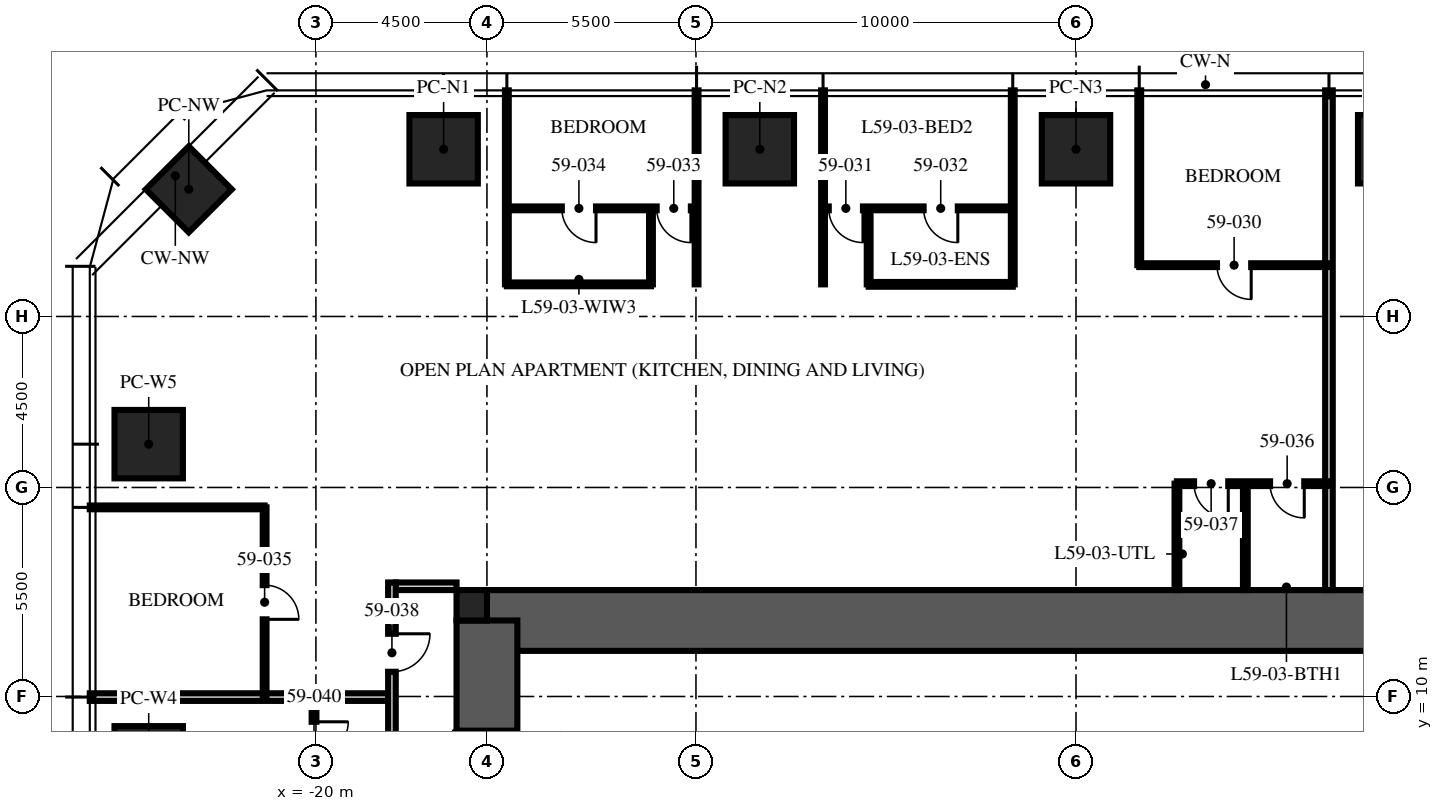
"""IFC4 building model, lengths in metres.
Left out: names, types, materials, properties, quantities, classifications, styles, units other than length and angle.
Written with IfcOpenShell. Run it as: python <this file> out.ifc"""

import sys

from ifc_helpers import new_model, si_unit, direction, frame, frame_2d, origin, origin_2d, place, context, subcontext, project, spatial, rectangle, extrude, element, fill, save


model = new_model("IFC4")
c1 = context("Model", 3, precision=1e-05, world=origin(), true_north=direction((0.0, 1.0)))
c2 = subcontext(c1, "Body", "Model", "MODEL_VIEW")
j1 = project(units=[si_unit("LENGTHUNIT", "METRE"), si_unit("PLANEANGLEUNIT", "RADIAN")], contexts=[c1])
p1 = place(None, origin())
s1 = spatial("IfcSite", under=j1, at=p1, CompositionType="ELEMENT")
p2 = place(p1, origin())
s2 = spatial("IfcBuilding", under=s1, at=p2, CompositionType="ELEMENT")
p3 = place(p2, frame((0.0, 0.0, 237.0)))
s3 = spatial("IfcBuildingStorey", under=s2, at=p3, CompositionType="ELEMENT", Elevation=237.0)
p4 = place(p3, frame((-15.5, 12.0, -0.25), z_axis=(0.0, 0.0, 1.0), x_axis=(1.0, 0.0, 0.0)))
e1 = element("IfcWall", 1, at=p4, inside=s3, PredefinedType="SHEAR", context=c2, shape_type="SweptSolid", body=[
    extrude(rectangle(XDim=31.0, YDim=1.6, at=frame_2d((15.5, 0.0))), origin(), (0.0, 0.0, 1.0), 3.75),
])
p5 = place(p3, frame((-15.5, -12.0, -0.25), z_axis=(0.0, 0.0, 1.0), x_axis=(0.0, 1.0, 0.0)))
e2 = element("IfcWall", 2, at=p5, inside=s3, PredefinedType="SHEAR", context=c2, shape_type="SweptSolid", body=[
    extrude(rectangle(XDim=24.0, YDim=1.6, at=frame_2d((12.0, 0.0))), origin(), (0.0, 0.0, 1.0), 3.75),
])
p6 = place(p5, frame((3.2, 0.0, 0.25)))
e3 = element("IfcOpeningElement", 3, at=p6, cuts=e2, PredefinedType="OPENING", context=c2, shape_type="SweptSolid", body=[
    extrude(rectangle(XDim=1.2, YDim=2.1, at=frame_2d((0.6, 1.05))), frame((0.0, 0.81, 0.0), z_axis=(0.0, -1.0, 0.0), x_axis=(1.0, 0.0, 0.0)), (0.0, 0.0, 1.0), 1.62),
])
p7 = place(p5, frame((19.3, 0.0, 0.25)))
e4 = element("IfcOpeningElement", 4, at=p7, cuts=e2, PredefinedType="OPENING", context=c2, shape_type="SweptSolid", body=[
    extrude(rectangle(XDim=1.8, YDim=2.1, at=frame_2d((0.9, 1.05))), frame((0.0, 0.81, 0.0), z_axis=(0.0, -1.0, 0.0), x_axis=(1.0, 0.0, 0.0)), (0.0, 0.0, 1.0), 1.62),
])
p8 = place(p3, frame((-15.9, 12.4, -0.25), z_axis=(0.0, 0.0, 1.0), x_axis=(1.0, 0.0, 0.0)))
e5 = element("IfcColumn", 5, at=p8, inside=s3, PredefinedType="COLUMN", context=c2, shape_type="SweptSolid", body=[
    extrude(rectangle(XDim=0.8, YDim=0.8, at=origin_2d()), origin(), (0.0, 0.0, 1.0), 3.75),
])
for number, where, z_axis, x_axis in (
    (6, (-16.64, 24.4, 0.0), (0.0, 0.0, 1.0), (1.0, 0.0, 0.0)),
    (7, (-8.32, 24.4, 0.0), (0.0, 0.0, 1.0), (1.0, 0.0, 0.0)),
    (8, (0.0, 24.4, 0.0), (0.0, 0.0, 1.0), (1.0, 0.0, 0.0)),
    (9, (8.32, 24.4, 0.0), (0.0, 0.0, 1.0), (1.0, 0.0, 0.0)),
    (10, (-24.4, 8.32, 0.0), (0.0, 0.0, 1.0), (0.0, 1.0, 0.0)),
    (11, (-24.4, 16.64, 0.0), (0.0, 0.0, 1.0), (0.0, 1.0, 0.0)),
):
    element("IfcColumn", number, at=place(p3, frame(where, z_axis=z_axis, x_axis=x_axis)), inside=s3, PredefinedType="COLUMN", context=c2, shape_type="SweptSolid", body=[
        extrude(rectangle(XDim=1.8, YDim=1.8, at=origin_2d()), origin(), (0.0, 0.0, 1.0), 3.75),
    ])
p9 = place(p3, frame((-23.346, 23.346, 0.0), z_axis=(0.0, 0.0, 1.0), x_axis=(0.707106781187, 0.707106781187, 0.0)))
e12 = element("IfcColumn", 12, at=p9, inside=s3, PredefinedType="COLUMN", context=c2, shape_type="SweptSolid", body=[
    extrude(rectangle(XDim=1.6, YDim=1.6, at=origin_2d()), origin(), (0.0, 0.0, 1.0), 3.75),
])
p10 = place(p3, frame((-16.3, 12.9, 0.0), z_axis=(0.0, 0.0, 1.0), x_axis=(-1.0, 0.0, 0.0)))
e13 = element("IfcWall", 13, at=p10, inside=s3, PredefinedType="PARTITIONING", context=c2, shape_type="SweptSolid", body=[
    extrude(rectangle(XDim=1.6, YDim=0.2, at=frame_2d((0.8, 0.0))), origin(), (0.0, 0.0, 1.0), 2.3),
])
p11 = place(p3, frame((6.656, 12.8, 0.0), z_axis=(0.0, 0.0, 1.0), x_axis=(0.0, 1.0, 0.0)))
e14 = element("IfcWall", 14, at=p11, inside=s3, PredefinedType="PARTITIONING", context=c2, shape_type="SweptSolid", body=[
    extrude(rectangle(XDim=13.15, YDim=0.2, at=frame_2d((6.575, 0.0))), origin(), (0.0, 0.0, 1.0), 2.91),
])
p12 = place(p3, frame((1.664, 21.35, 0.0), z_axis=(0.0, 0.0, 1.0), x_axis=(0.0, 1.0, 0.0)))
e15 = element("IfcWall", 15, at=p12, inside=s3, PredefinedType="PARTITIONING", context=c2, shape_type="SweptSolid", body=[
    extrude(rectangle(XDim=4.6, YDim=0.1, at=frame_2d((2.3, 0.0))), origin(), (0.0, 0.0, 1.0), 2.91),
])
for number, where, z_axis, x_axis in (
    (16, (-1.664, 20.845, 0.0), (0.0, 0.0, 1.0), (0.0, 1.0, 0.0)),
    (17, (-6.656, 20.845, 0.0), (0.0, 0.0, 1.0), (0.0, 1.0, 0.0)),
    (18, (-9.984, 20.845, 0.0), (0.0, 0.0, 1.0), (0.0, 1.0, 0.0)),
    (19, (-14.976, 20.845, 0.0), (0.0, 0.0, 1.0), (0.0, 1.0, 0.0)),
):
    element("IfcWall", number, at=place(p3, frame(where, z_axis=z_axis, x_axis=x_axis)), inside=s3, PredefinedType="PARTITIONING", context=c2, shape_type="SweptSolid", body=[
        extrude(rectangle(XDim=5.105, YDim=0.1, at=frame_2d((2.552, 0.0))), origin(), (0.0, 0.0, 1.0), 2.91),
    ])
p13 = place(p3, frame((-21.35, 14.976, 0.0), z_axis=(0.0, 0.0, 1.0), x_axis=(-1.0, 0.0, 0.0)))
e20 = element("IfcWall", 20, at=p13, inside=s3, PredefinedType="PARTITIONING", context=c2, shape_type="SweptSolid", body=[
    extrude(rectangle(XDim=4.6, YDim=0.1, at=frame_2d((2.3, 0.0))), origin(), (0.0, 0.0, 1.0), 2.91),
])
p14 = place(p3, frame((-18.1, 9.984, 0.0), z_axis=(0.0, 0.0, 1.0), x_axis=(-1.0, 0.0, 0.0)))
e21 = element("IfcWall", 21, at=p14, inside=s3, PredefinedType="PARTITIONING", context=c2, shape_type="SweptSolid", body=[
    extrude(rectangle(XDim=7.85, YDim=0.2, at=frame_2d((3.925, 0.0))), origin(), (0.0, 0.0, 1.0), 2.91),
])
p15 = place(p3, frame((6.656, 21.35, 0.0), z_axis=(0.0, 0.0, 1.0), x_axis=(-1.0, 0.0, 0.0)))
e22 = element("IfcWall", 22, at=p15, inside=s3, PredefinedType="PARTITIONING", context=c2, shape_type="SweptSolid", body=[
    extrude(rectangle(XDim=4.992, YDim=0.1, at=frame_2d((2.496, 0.0))), origin(), (0.0, 0.0, 1.0), 2.81),
])
p16 = place(p15, frame((2.046, 0.0, 0.0)))
e23 = element("IfcOpeningElement", 23, at=p16, cuts=e22, PredefinedType="OPENING", context=c2, shape_type="SweptSolid", body=[
    extrude(rectangle(XDim=0.9, YDim=2.1, at=frame_2d((0.45, 1.05))), frame((0.0, 0.06, 0.0), z_axis=(0.0, -1.0, 0.0), x_axis=(1.0, 0.0, 0.0)), (0.0, 0.0, 1.0), 0.12),
])
p17 = place(p3, frame((-1.664, 22.845, 0.0), z_axis=(0.0, 0.0, 1.0), x_axis=(-1.0, 0.0, 0.0)))
e24 = element("IfcWall", 24, at=p17, inside=s3, PredefinedType="PARTITIONING", context=c2, shape_type="SweptSolid", body=[
    extrude(rectangle(XDim=4.992, YDim=0.1, at=frame_2d((2.496, 0.0))), origin(), (0.0, 0.0, 1.0), 2.81),
])
p18 = place(p17, frame((3.942, 0.0, 0.0)))
e25 = element("IfcOpeningElement", 25, at=p18, cuts=e24, PredefinedType="OPENING", context=c2, shape_type="SweptSolid", body=[
    extrude(rectangle(XDim=0.9, YDim=2.1, at=frame_2d((0.45, 1.05))), frame((0.0, 0.06, 0.0), z_axis=(0.0, -1.0, 0.0), x_axis=(1.0, 0.0, 0.0)), (0.0, 0.0, 1.0), 0.12),
])
p19 = place(p17, frame((1.446, 0.0, 0.0)))
e26 = element("IfcOpeningElement", 26, at=p19, cuts=e24, PredefinedType="OPENING", context=c2, shape_type="SweptSolid", body=[
    extrude(rectangle(XDim=0.9, YDim=2.1, at=frame_2d((0.45, 1.05))), frame((0.0, 0.06, 0.0), z_axis=(0.0, -1.0, 0.0), x_axis=(1.0, 0.0, 0.0)), (0.0, 0.0, 1.0), 0.12),
])
p20 = place(p3, frame((-5.456, 20.845, 0.0), z_axis=(0.0, 0.0, 1.0), x_axis=(0.0, 1.0, 0.0)))
e27 = element("IfcWall", 27, at=p20, inside=s3, PredefinedType="PARTITIONING", context=c2, shape_type="SweptSolid", body=[
    extrude(rectangle(XDim=2.0, YDim=0.1, at=frame_2d((1.0, 0.0))), origin(), (0.0, 0.0, 1.0), 3.5),
])
p21 = place(p3, frame((-1.664, 20.845, 0.0), z_axis=(0.0, 0.0, 1.0), x_axis=(-1.0, 0.0, 0.0)))
e28 = element("IfcWall", 28, at=p21, inside=s3, PredefinedType="PARTITIONING", context=c2, shape_type="SweptSolid", body=[
    extrude(rectangle(XDim=3.792, YDim=0.125, at=frame_2d((1.896, 0.0))), origin(), (0.0, 0.0, 1.0), 2.81),
])
p22 = place(p3, frame((-9.984, 22.845, 0.0), z_axis=(0.0, 0.0, 1.0), x_axis=(-1.0, 0.0, 0.0)))
e29 = element("IfcWall", 29, at=p22, inside=s3, PredefinedType="PARTITIONING", context=c2, shape_type="SweptSolid", body=[
    extrude(rectangle(XDim=4.992, YDim=0.1, at=frame_2d((2.496, 0.0))), origin(), (0.0, 0.0, 1.0), 2.81),
])
p23 = place(p22, frame((0.15, 0.0, 0.0)))
e30 = element("IfcOpeningElement", 30, at=p23, cuts=e29, PredefinedType="OPENING", context=c2, shape_type="SweptSolid", body=[
    extrude(rectangle(XDim=0.9, YDim=2.1, at=frame_2d((0.45, 1.05))), frame((0.0, 0.06, 0.0), z_axis=(0.0, -1.0, 0.0), x_axis=(1.0, 0.0, 0.0)), (0.0, 0.0, 1.0), 0.12),
])
p24 = place(p22, frame((2.646, 0.0, 0.0)))
e31 = element("IfcOpeningElement", 31, at=p24, cuts=e29, PredefinedType="OPENING", context=c2, shape_type="SweptSolid", body=[
    extrude(rectangle(XDim=0.9, YDim=2.1, at=frame_2d((0.45, 1.05))), frame((0.0, 0.06, 0.0), z_axis=(0.0, -1.0, 0.0), x_axis=(1.0, 0.0, 0.0)), (0.0, 0.0, 1.0), 0.12),
])
p25 = place(p3, frame((-11.184, 20.845, 0.0), z_axis=(0.0, 0.0, 1.0), x_axis=(0.0, 1.0, 0.0)))
e32 = element("IfcWall", 32, at=p25, inside=s3, PredefinedType="PARTITIONING", context=c2, shape_type="SweptSolid", body=[
    extrude(rectangle(XDim=2.0, YDim=0.1, at=frame_2d((1.0, 0.0))), origin(), (0.0, 0.0, 1.0), 3.5),
])
p26 = place(p3, frame((-11.184, 20.845, 0.0), z_axis=(0.0, 0.0, 1.0), x_axis=(-1.0, 0.0, 0.0)))
e33 = element("IfcWall", 33, at=p26, inside=s3, PredefinedType="PARTITIONING", context=c2, shape_type="SweptSolid", body=[
    extrude(rectangle(XDim=3.792, YDim=0.1, at=frame_2d((1.896, 0.0))), origin(), (0.0, 0.0, 1.0), 2.81),
])
p27 = place(p3, frame((-21.35, 14.976, 0.0), z_axis=(0.0, 0.0, 1.0), x_axis=(0.0, -1.0, 0.0)))
e34 = element("IfcWall", 34, at=p27, inside=s3, PredefinedType="PARTITIONING", context=c2, shape_type="SweptSolid", body=[
    extrude(rectangle(XDim=4.992, YDim=0.1, at=frame_2d((2.496, 0.0))), origin(), (0.0, 0.0, 1.0), 2.81),
])
p28 = place(p27, frame((2.046, 0.0, 0.0)))
e35 = element("IfcOpeningElement", 35, at=p28, cuts=e34, PredefinedType="OPENING", context=c2, shape_type="SweptSolid", body=[
    extrude(rectangle(XDim=0.9, YDim=2.1, at=frame_2d((0.45, 1.05))), frame((0.0, 0.06, 0.0), z_axis=(0.0, -1.0, 0.0), x_axis=(1.0, 0.0, 0.0)), (0.0, 0.0, 1.0), 0.12),
])
p29 = place(p3, frame((6.656, 15.6, 0.0), z_axis=(0.0, 0.0, 1.0), x_axis=(-1.0, 0.0, 0.0)))
e36 = element("IfcWall", 36, at=p29, inside=s3, PredefinedType="PARTITIONING", context=c2, shape_type="SweptSolid", body=[
    extrude(rectangle(XDim=4.0, YDim=0.125, at=frame_2d((2.0, 0.0))), origin(), (0.0, 0.0, 1.0), 2.81),
])
p30 = place(p29, frame((0.65, 0.0, 0.0)))
e37 = element("IfcOpeningElement", 37, at=p30, cuts=e36, PredefinedType="OPENING", context=c2, shape_type="SweptSolid", body=[
    extrude(rectangle(XDim=0.9, YDim=2.1, at=frame_2d((0.45, 1.05))), frame((0.0, 0.073, 0.0), z_axis=(0.0, -1.0, 0.0), x_axis=(1.0, 0.0, 0.0)), (0.0, 0.0, 1.0), 0.145),
])
p31 = place(p29, frame((2.65, 0.0, 0.0)))
e38 = element("IfcOpeningElement", 38, at=p31, cuts=e36, PredefinedType="OPENING", context=c2, shape_type="SweptSolid", body=[
    extrude(rectangle(XDim=0.9, YDim=2.1, at=frame_2d((0.45, 1.05))), frame((0.0, 0.073, 0.0), z_axis=(0.0, -1.0, 0.0), x_axis=(1.0, 0.0, 0.0)), (0.0, 0.0, 1.0), 0.145),
])
for number, where, z_axis, x_axis in (
    (39, (4.456, 12.8, 0.0), (0.0, 0.0, 1.0), (0.0, 1.0, 0.0)),
    (40, (2.656, 12.8, 0.0), (0.0, 0.0, 1.0), (0.0, 1.0, 0.0)),
):
    element("IfcWall", number, at=place(p3, frame(where, z_axis=z_axis, x_axis=x_axis)), inside=s3, PredefinedType="PARTITIONING", context=c2, shape_type="SweptSolid", body=[
        extrude(rectangle(XDim=2.8, YDim=0.125, at=frame_2d((1.4, 0.0))), origin(), (0.0, 0.0, 1.0), 3.5),
    ])
p32 = place(p3, frame((-20.05, 9.984, 0.0), z_axis=(0.0, 0.0, 1.0), x_axis=(0.0, -1.0, 0.0)))
e41 = element("IfcWall", 41, at=p32, inside=s3, PredefinedType="PARTITIONING", context=c2, shape_type="SweptSolid", body=[
    extrude(rectangle(XDim=2.2, YDim=0.125, at=frame_2d((1.1, 0.0))), origin(), (0.0, 0.0, 1.0), 2.6),
])
p33 = place(p32, frame((0.65, 0.0, 0.0)))
e42 = element("IfcOpeningElement", 42, at=p33, cuts=e41, PredefinedType="OPENING", context=c2, shape_type="SweptSolid", body=[
    extrude(rectangle(XDim=0.9, YDim=2.1, at=frame_2d((0.45, 1.05))), frame((0.0, 0.073, 0.0), z_axis=(0.0, -1.0, 0.0), x_axis=(1.0, 0.0, 0.0)), (0.0, 0.0, 1.0), 0.145),
])
p34 = place(p3, frame((-18.0, 13.0, 0.0), z_axis=(0.0, 0.0, 1.0), x_axis=(0.0, -1.0, 0.0)))
e43 = element("IfcWall", 43, at=p34, inside=s3, PredefinedType="PARTITIONING", context=c2, shape_type="SweptSolid", body=[
    extrude(rectangle(XDim=26.0, YDim=0.2, at=frame_2d((13.0, 0.0))), origin(), (0.0, 0.0, 1.0), 2.6),
])
p35 = place(p34, frame((1.35, 0.0, 0.0)))
e44 = element("IfcOpeningElement", 44, at=p35, cuts=e43, PredefinedType="OPENING", context=c2, shape_type="SweptSolid", body=[
    extrude(rectangle(XDim=1.0, YDim=2.2, at=frame_2d((0.5, 1.1))), frame((0.0, 0.11, 0.0), z_axis=(0.0, -1.0, 0.0), x_axis=(1.0, 0.0, 0.0)), (0.0, 0.0, 1.0), 0.22),
])
p36 = place(p34, frame((9.786, 0.0, 0.0)))
e45 = element("IfcOpeningElement", 45, at=p36, cuts=e43, PredefinedType="OPENING", context=c2, shape_type="SweptSolid", body=[
    extrude(rectangle(XDim=1.0, YDim=2.2, at=frame_2d((0.5, 1.1))), frame((0.0, 0.11, 0.0), z_axis=(0.0, -1.0, 0.0), x_axis=(1.0, 0.0, 0.0)), (0.0, 0.0, 1.0), 0.22),
])
p37 = place(p34, frame((23.856, 0.0, 0.0)))
e46 = element("IfcOpeningElement", 46, at=p37, cuts=e43, PredefinedType="OPENING", context=c2, shape_type="SweptSolid", body=[
    extrude(rectangle(XDim=1.0, YDim=2.2, at=frame_2d((0.5, 1.1))), frame((0.0, 0.11, 0.0), z_axis=(0.0, -1.0, 0.0), x_axis=(1.0, 0.0, 0.0)), (0.0, 0.0, 1.0), 0.22),
])
p38 = place(p7, origin())
e47 = element("IfcDoor", 47, at=p38, inside=s3, OperationType="DOUBLE_DOOR_SINGLE_SWING", PredefinedType="DOOR", context=c2, shape_type="SweptSolid", body=[
    extrude(rectangle(XDim=1.8, YDim=2.1, at=frame_2d((0.9, 1.05))), frame((0.0, 0.025, 0.0), z_axis=(0.0, -1.0, 0.0), x_axis=(1.0, 0.0, 0.0)), (0.0, 0.0, 1.0), 0.05),
])
fill(e4, e47)
p39 = place(p16, origin())
e48 = element("IfcDoor", 48, at=p39, inside=s3, OperationType="SINGLE_SWING_LEFT", PredefinedType="DOOR", context=c2, shape_type="SweptSolid", body=[
    extrude(rectangle(XDim=0.9, YDim=2.1, at=frame_2d((0.45, 1.05))), frame((0.0, 0.025, 0.0), z_axis=(0.0, -1.0, 0.0), x_axis=(1.0, 0.0, 0.0)), (0.0, 0.0, 1.0), 0.05),
])
fill(e23, e48)
p40 = place(p18, origin())
e49 = element("IfcDoor", 49, at=p40, inside=s3, OperationType="SINGLE_SWING_LEFT", PredefinedType="DOOR", context=c2, shape_type="SweptSolid", body=[
    extrude(rectangle(XDim=0.9, YDim=2.1, at=frame_2d((0.45, 1.05))), frame((0.0, 0.025, 0.0), z_axis=(0.0, -1.0, 0.0), x_axis=(1.0, 0.0, 0.0)), (0.0, 0.0, 1.0), 0.05),
])
fill(e25, e49)
p41 = place(p19, origin())
e50 = element("IfcDoor", 50, at=p41, inside=s3, OperationType="SINGLE_SWING_LEFT", PredefinedType="DOOR", context=c2, shape_type="SweptSolid", body=[
    extrude(rectangle(XDim=0.9, YDim=2.1, at=frame_2d((0.45, 1.05))), frame((0.0, 0.025, 0.0), z_axis=(0.0, -1.0, 0.0), x_axis=(1.0, 0.0, 0.0)), (0.0, 0.0, 1.0), 0.05),
])
fill(e26, e50)
p42 = place(p23, origin())
e51 = element("IfcDoor", 51, at=p42, inside=s3, OperationType="SINGLE_SWING_LEFT", PredefinedType="DOOR", context=c2, shape_type="SweptSolid", body=[
    extrude(rectangle(XDim=0.9, YDim=2.1, at=frame_2d((0.45, 1.05))), frame((0.0, 0.025, 0.0), z_axis=(0.0, -1.0, 0.0), x_axis=(1.0, 0.0, 0.0)), (0.0, 0.0, 1.0), 0.05),
])
fill(e30, e51)
p43 = place(p24, origin())
e52 = element("IfcDoor", 52, at=p43, inside=s3, OperationType="SINGLE_SWING_LEFT", PredefinedType="DOOR", context=c2, shape_type="SweptSolid", body=[
    extrude(rectangle(XDim=0.9, YDim=2.1, at=frame_2d((0.45, 1.05))), frame((0.0, 0.025, 0.0), z_axis=(0.0, -1.0, 0.0), x_axis=(1.0, 0.0, 0.0)), (0.0, 0.0, 1.0), 0.05),
])
fill(e31, e52)
p44 = place(p28, origin())
e53 = element("IfcDoor", 53, at=p44, inside=s3, OperationType="SINGLE_SWING_RIGHT", PredefinedType="DOOR", context=c2, shape_type="SweptSolid", body=[
    extrude(rectangle(XDim=0.9, YDim=2.1, at=frame_2d((0.45, 1.05))), frame((0.0, 0.025, 0.0), z_axis=(0.0, -1.0, 0.0), x_axis=(1.0, 0.0, 0.0)), (0.0, 0.0, 1.0), 0.05),
])
fill(e35, e53)
p45 = place(p30, origin())
e54 = element("IfcDoor", 54, at=p45, inside=s3, OperationType="SINGLE_SWING_LEFT", PredefinedType="DOOR", context=c2, shape_type="SweptSolid", body=[
    extrude(rectangle(XDim=0.9, YDim=2.1, at=frame_2d((0.45, 1.05))), frame((0.0, 0.025, 0.0), z_axis=(0.0, -1.0, 0.0), x_axis=(1.0, 0.0, 0.0)), (0.0, 0.0, 1.0), 0.05),
])
fill(e37, e54)
p46 = place(p31, origin())
e55 = element("IfcDoor", 55, at=p46, inside=s3, OperationType="SINGLE_SWING_LEFT", PredefinedType="DOOR", context=c2, shape_type="SweptSolid", body=[
    extrude(rectangle(XDim=0.9, YDim=2.1, at=frame_2d((0.45, 1.05))), frame((0.0, 0.025, 0.0), z_axis=(0.0, -1.0, 0.0), x_axis=(1.0, 0.0, 0.0)), (0.0, 0.0, 1.0), 0.05),
])
fill(e38, e55)
p47 = place(p35, origin())
e56 = element("IfcDoor", 56, at=p47, inside=s3, OperationType="SINGLE_SWING_LEFT", PredefinedType="DOOR", context=c2, shape_type="SweptSolid", body=[
    extrude(rectangle(XDim=1.0, YDim=2.2, at=frame_2d((0.5, 1.1))), frame((0.0, 0.025, 0.0), z_axis=(0.0, -1.0, 0.0), x_axis=(1.0, 0.0, 0.0)), (0.0, 0.0, 1.0), 0.05),
])
fill(e44, e56)
p48 = place(p33, origin())
e57 = element("IfcDoor", 57, at=p48, inside=s3, OperationType="SINGLE_SWING_LEFT", PredefinedType="DOOR", context=c2, shape_type="SweptSolid", body=[
    extrude(rectangle(XDim=0.9, YDim=2.1, at=frame_2d((0.45, 1.05))), frame((0.0, 0.025, 0.0), z_axis=(0.0, -1.0, 0.0), x_axis=(1.0, 0.0, 0.0)), (0.0, 0.0, 1.0), 0.05),
])
fill(e42, e57)
save(model, sys.argv[1])
